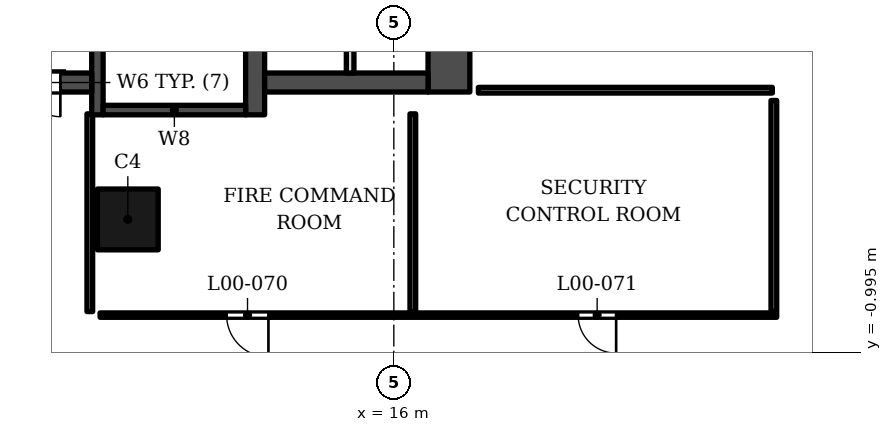
"""IFC4 building model, lengths in metres.
Left out: names, types, materials, properties, quantities, classifications, styles, units other than length and angle.
Written with IfcOpenShell. Run it as: python <this file> out.ifc"""

import sys

from ifc_helpers import new_model, si_unit, direction, frame, frame_2d, origin, origin_2d, place, context, subcontext, project, spatial, rectangle, extrude, element, fill, save


model = new_model("IFC4")
c1 = context("Model", 3, precision=1e-05, world=origin(), true_north=direction((0.0, 1.0)))
c2 = subcontext(c1, "Body", "Model", "MODEL_VIEW")
j1 = project(units=[si_unit("LENGTHUNIT", "METRE"), si_unit("PLANEANGLEUNIT", "RADIAN")], contexts=[c1])
p1 = place(None, origin())
s1 = spatial("IfcSite", under=j1, at=p1, CompositionType="ELEMENT")
p2 = place(p1, origin())
s2 = spatial("IfcBuilding", under=s1, at=p2, CompositionType="ELEMENT")
p3 = place(p2, origin())
s3 = spatial("IfcBuildingStorey", under=s2, at=p3, CompositionType="ELEMENT", Elevation=0.0)
p4 = place(p3, frame((9.0, 2.5, 0.0), z_axis=(0.0, 0.0, 1.0), x_axis=(1.0, 0.0, 0.0)))
e1 = element("IfcColumn", 1, at=p4, inside=s3, PredefinedType="COLUMN", context=c2, shape_type="SweptSolid", body=[
    extrude(rectangle(XDim=1.6, YDim=1.6, at=origin_2d()), origin(), (0.0, 0.0, 1.0), 9.0),
])
p5 = place(p3, frame((12.35, 5.253, 0.0), z_axis=(0.0, 0.0, 1.0), x_axis=(0.0, 1.0, 0.0)))
e2 = element("IfcWall", 2, at=p5, inside=s3, PredefinedType="SHEAR", context=c2, shape_type="SweptSolid", body=[
    extrude(rectangle(XDim=13.3, YDim=0.5, at=frame_2d((6.65, 0.0))), origin(), (0.0, 0.0, 1.0), 9.0),
])
p6 = place(p3, frame((8.2, 5.253, 0.0), z_axis=(0.0, 0.0, 1.0), x_axis=(0.0, 1.0, 0.0)))
e3 = element("IfcWall", 3, at=p6, inside=s3, PredefinedType="SHEAR", context=c2, shape_type="SweptSolid", body=[
    extrude(rectangle(XDim=13.3, YDim=0.3, at=frame_2d((6.65, 0.0))), origin(), (0.0, 0.0, 1.0), 9.0),
])
p7 = place(p6, frame((7.1, 0.0, 0.0)))
e4 = element("IfcOpeningElement", 4, at=p7, cuts=e3, PredefinedType="OPENING", context=c2, shape_type="SweptSolid", body=[
    extrude(rectangle(XDim=1.4, YDim=2.1, at=frame_2d((0.7, 1.05))), frame((0.0, 0.16, 0.0), z_axis=(0.0, -1.0, 0.0), x_axis=(1.0, 0.0, 0.0)), (0.0, 0.0, 1.0), 0.32),
])
p8 = place(p6, frame((5.05, 0.0, 0.0)))
e5 = element("IfcOpeningElement", 5, at=p8, cuts=e3, PredefinedType="OPENING", context=c2, shape_type="SweptSolid", body=[
    extrude(rectangle(XDim=1.4, YDim=2.1, at=frame_2d((0.7, 1.05))), frame((0.0, 0.16, 0.0), z_axis=(0.0, -1.0, 0.0), x_axis=(1.0, 0.0, 0.0)), (0.0, 0.0, 1.0), 0.32),
])
p9 = place(p3, frame((8.35, 5.378, 0.0), z_axis=(0.0, 0.0, 1.0), x_axis=(1.0, 0.0, 0.0)))
e6 = element("IfcWall", 6, at=p9, inside=s3, PredefinedType="SHEAR", context=c2, shape_type="SweptSolid", body=[
    extrude(rectangle(XDim=3.75, YDim=0.25, at=frame_2d((1.875, 0.0))), origin(), (0.0, 0.0, 1.0), 9.0),
])
p10 = place(p3, frame((1.0, 6.103, 0.0), z_axis=(0.0, 0.0, 1.0), x_axis=(1.0, 0.0, 0.0)))
e7 = element("IfcWall", 7, at=p10, inside=s3, PredefinedType="SHEAR", context=c2, shape_type="SweptSolid", body=[
    extrude(rectangle(XDim=7.05, YDim=0.5, at=frame_2d((3.525, 0.0))), origin(), (0.0, 0.0, 1.0), 9.0),
])
p11 = place(p10, frame((5.325, 0.0, 0.0)))
e8 = element("IfcOpeningElement", 8, at=p11, cuts=e7, PredefinedType="OPENING", context=c2, shape_type="SweptSolid", body=[
    extrude(rectangle(XDim=0.9, YDim=2.1, at=frame_2d((0.45, 1.05))), frame((0.0, 0.26, 0.0), z_axis=(0.0, -1.0, 0.0), x_axis=(1.0, 0.0, 0.0)), (0.0, 0.0, 1.0), 0.52),
])
p12 = place(p3, frame((12.6, 6.103, 0.0), z_axis=(0.0, 0.0, 1.0), x_axis=(1.0, 0.0, 0.0)))
e9 = element("IfcWall", 9, at=p12, inside=s3, PredefinedType="SHEAR", context=c2, shape_type="SweptSolid", body=[
    extrude(rectangle(XDim=4.3, YDim=0.5, at=frame_2d((2.15, 0.0))), origin(), (0.0, 0.0, 1.0), 9.0),
])
p13 = place(p3, frame((17.45, 5.853, 0.0), z_axis=(0.0, 0.0, 1.0), x_axis=(0.0, 1.0, 0.0)))
e10 = element("IfcWall", 10, at=p13, inside=s3, PredefinedType="SHEAR", context=c2, shape_type="SweptSolid", body=[
    extrude(rectangle(XDim=13.2, YDim=1.1, at=frame_2d((6.6, 0.0))), origin(), (0.0, 0.0, 1.0), 9.0),
])
p14 = place(p13, frame((4.1, 0.0, 0.0)))
e11 = element("IfcOpeningElement", 11, at=p14, cuts=e10, PredefinedType="OPENING", context=c2, shape_type="SweptSolid", body=[
    extrude(rectangle(XDim=1.6, YDim=2.1, at=frame_2d((0.8, 1.05))), frame((0.0, 0.56, 0.0), z_axis=(0.0, -1.0, 0.0), x_axis=(1.0, 0.0, 0.0)), (0.0, 0.0, 1.0), 1.12),
])
p15 = place(p13, frame((10.15, 0.0, 0.0)))
e12 = element("IfcOpeningElement", 12, at=p15, cuts=e10, PredefinedType="OPENING", context=c2, shape_type="SweptSolid", body=[
    extrude(rectangle(XDim=0.9, YDim=2.1, at=frame_2d((0.45, 1.05))), frame((0.0, 0.56, 0.0), z_axis=(0.0, -1.0, 0.0), x_axis=(1.0, 0.0, 0.0)), (0.0, 0.0, 1.0), 1.12),
])
p16 = place(p3, frame((14.85, 6.353, 0.0), z_axis=(0.0, 0.0, 1.0), x_axis=(0.0, 1.0, 0.0)))
e13 = element("IfcWall", 13, at=p16, inside=s3, PredefinedType="SOLIDWALL", context=c2, shape_type="SweptSolid", body=[
    extrude(rectangle(XDim=2.5, YDim=0.2, at=frame_2d((1.25, 0.0))), origin(), (0.0, 0.0, 1.0), 8.5),
])
p17 = place(p3, frame((8.27, -0.018, 0.0), z_axis=(0.0, 0.0, 1.0), x_axis=(1.0, 0.0, 0.0)))
e14 = element("IfcWall", 14, at=p17, inside=s3, PredefinedType="PARTITIONING", context=c2, shape_type="SweptSolid", body=[
    extrude(rectangle(XDim=17.805, YDim=0.115, at=frame_2d((8.902, 0.0))), origin(), (0.0, 0.0, 1.0), 7.3),
])
p18 = place(p17, frame((3.33, 0.0, 0.0)))
e15 = element("IfcOpeningElement", 15, at=p18, cuts=e14, PredefinedType="OPENING", context=c2, shape_type="SweptSolid", body=[
    extrude(rectangle(XDim=1.1, YDim=2.1, at=frame_2d((0.55, 1.05))), frame((0.0, 0.067, 0.0), z_axis=(0.0, -1.0, 0.0), x_axis=(1.0, 0.0, 0.0)), (0.0, 0.0, 1.0), 0.135),
])
p19 = place(p17, frame((12.58, 0.0, 0.0)))
e16 = element("IfcOpeningElement", 16, at=p19, cuts=e14, PredefinedType="OPENING", context=c2, shape_type="SweptSolid", body=[
    extrude(rectangle(XDim=1.0, YDim=2.1, at=frame_2d((0.5, 1.05))), frame((0.0, 0.067, 0.0), z_axis=(0.0, -1.0, 0.0), x_axis=(1.0, 0.0, 0.0)), (0.0, 0.0, 1.0), 0.135),
])
for number, where, z_axis, x_axis in (
    (17, (8.0, 0.075, 0.0), (0.0, 0.0, 1.0), (0.0, 1.0, 0.0)),
    (18, (16.5, 0.075, 0.0), (0.0, 0.0, 1.0), (0.0, 1.0, 0.0)),
):
    element("IfcWall", number, at=place(p3, frame(where, z_axis=z_axis, x_axis=x_axis)), inside=s3, PredefinedType="PARTITIONING", context=c2, shape_type="SweptSolid", body=[
        extrude(rectangle(XDim=5.203, YDim=0.15, at=frame_2d((2.602, 0.0))), origin(), (0.0, 0.0, 1.0), 8.5),
    ])
p20 = place(p3, frame((26.0, 0.075, 0.0), z_axis=(0.0, 0.0, 1.0), x_axis=(0.0, 1.0, 0.0)))
e19 = element("IfcWall", 19, at=p20, inside=s3, PredefinedType="PARTITIONING", context=c2, shape_type="SweptSolid", body=[
    extrude(rectangle(XDim=5.555, YDim=0.15, at=frame_2d((2.777, 0.0))), origin(), (0.0, 0.0, 1.0), 8.5),
])
p21 = place(p3, frame((18.225, 5.9, 0.0), z_axis=(0.0, 0.0, 1.0), x_axis=(1.0, 0.0, 0.0)))
e20 = element("IfcWall", 20, at=p21, inside=s3, PredefinedType="PARTITIONING", context=c2, shape_type="SweptSolid", body=[
    extrude(rectangle(XDim=7.735, YDim=0.15, at=frame_2d((3.867, 0.0))), origin(), (0.0, 0.0, 1.0), 7.6),
])
p22 = place(p11, origin())
e21 = element("IfcDoor", 21, at=p22, inside=s3, OperationType="SINGLE_SWING_RIGHT", PredefinedType="DOOR", context=c2, shape_type="SweptSolid", body=[
    extrude(rectangle(XDim=0.9, YDim=2.1, at=frame_2d((0.45, 1.05))), frame((0.0, 0.025, 0.0), z_axis=(0.0, -1.0, 0.0), x_axis=(1.0, 0.0, 0.0)), (0.0, 0.0, 1.0), 0.05),
])
fill(e8, e21)
p23 = place(p18, origin())
e22 = element("IfcDoor", 22, at=p23, inside=s3, OperationType="SINGLE_SWING_RIGHT", PredefinedType="DOOR", context=c2, shape_type="SweptSolid", body=[
    extrude(rectangle(XDim=1.1, YDim=2.1, at=frame_2d((0.55, 1.05))), frame((0.0, 0.025, 0.0), z_axis=(0.0, -1.0, 0.0), x_axis=(1.0, 0.0, 0.0)), (0.0, 0.0, 1.0), 0.05),
])
fill(e15, e22)
p24 = place(p19, origin())
e23 = element("IfcDoor", 23, at=p24, inside=s3, OperationType="SINGLE_SWING_RIGHT", PredefinedType="DOOR", context=c2, shape_type="SweptSolid", body=[
    extrude(rectangle(XDim=1.0, YDim=2.1, at=frame_2d((0.5, 1.05))), frame((0.0, 0.025, 0.0), z_axis=(0.0, -1.0, 0.0), x_axis=(1.0, 0.0, 0.0)), (0.0, 0.0, 1.0), 0.05),
])
fill(e16, e23)
save(model, sys.argv[1])
